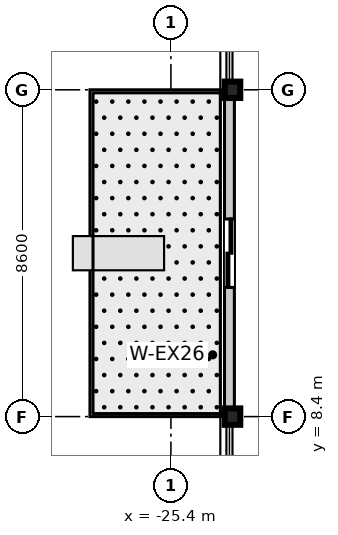
"""IFC4 building model, lengths in metres.
Left out: names, types, materials, properties, quantities, classifications, styles, units other than length and angle.
Written with IfcOpenShell. Run it as: python <this file> out.ifc"""

import sys

from ifc_helpers import new_model, si_unit, direction, frame, frame_2d, origin, origin_2d, place, context, subcontext, project, spatial, rectangle, i_section, extrude, source, transform, mapped, element, fill, save


model = new_model("IFC4")
c1 = context("Model", 3, precision=1e-05, world=origin(), true_north=direction((0.0, 1.0)))
c2 = subcontext(c1, "Body", "Model", "MODEL_VIEW")
j1 = project(units=[si_unit("LENGTHUNIT", "METRE"), si_unit("PLANEANGLEUNIT", "RADIAN")], contexts=[c1])
p1 = place(None, origin())
s1 = spatial("IfcSite", under=j1, at=p1, CompositionType="ELEMENT")
p2 = place(p1, origin())
s2 = spatial("IfcBuilding", under=s1, at=p2, CompositionType="ELEMENT")
p3 = place(p2, frame((0.0, 0.0, 91.95)))
s3 = spatial("IfcBuildingStorey", under=s2, at=p3, CompositionType="ELEMENT", Elevation=91.95)
m1 = source(origin(), c2, "Body", "SweptSolid", [
    extrude(i_section(OverallWidth=0.409, OverallDepth=0.43, WebThickness=0.021, FlangeThickness=0.034, at=origin_2d()), origin(), (0.0, 0.0, 1.0), 3.605),
])
for number, where, z_axis, x_axis in (
    (1, (-23.78, 8.4, 0.0), (0.0, 0.0, 1.0), (1.0, 0.0, 0.0)),
    (2, (-23.78, 17.0, 0.0), (0.0, 0.0, 1.0), (1.0, 0.0, 0.0)),
):
    element("IfcColumn", number, at=place(p3, frame(where, z_axis=z_axis, x_axis=x_axis)), inside=s3, PredefinedType="COLUMN", context=c2, shape_type="MappedRepresentation", body=[
        mapped(m1, transform((0.0, 0.0, 0.0), scale=1.0)),
    ])
m2 = source(origin(), c2, "Body", "SweptSolid", [
    extrude(rectangle(XDim=8.6, YDim=0.26, at=frame_2d((4.3, 0.0))), origin(), (0.0, 0.0, 1.0), 2.86),
])
p4 = place(p3, frame((-23.86, 8.4, 0.0), z_axis=(0.0, 0.0, 1.0), x_axis=(0.0, 1.0, 0.0)))
e3 = element("IfcWall", 3, at=p4, inside=s3, PredefinedType="STANDARD", context=c2, shape_type="MappedRepresentation", body=[
    mapped(m2, transform((0.0, 0.0, 0.0), scale=1.0)),
])
p5 = place(p4, frame((3.4, 0.0, 0.0)))
e4 = element("IfcOpeningElement", 4, at=p5, cuts=e3, PredefinedType="OPENING", context=c2, shape_type="SweptSolid", body=[
    extrude(rectangle(XDim=1.8, YDim=2.25, at=frame_2d((0.9, 1.125))), frame((0.0, 0.14, 0.0), z_axis=(0.0, -1.0, 0.0), x_axis=(1.0, 0.0, 0.0)), (0.0, 0.0, 1.0), 0.28),
])
m3 = source(origin(), c2, "Body", "SweptSolid", [
    extrude(rectangle(XDim=1.8, YDim=2.25, at=frame_2d((0.9, 1.125))), frame((0.0, 0.025, 0.0), z_axis=(0.0, -1.0, 0.0), x_axis=(1.0, 0.0, 0.0)), (0.0, 0.0, 1.0), 0.05),
])
p6 = place(p5, origin())
e5 = element("IfcDoor", 5, at=p6, inside=s3, OperationType="DOUBLE_DOOR_SLIDING", PredefinedType="DOOR", context=c2, shape_type="MappedRepresentation", body=[
    mapped(m3, transform((0.0, 0.0, 0.0), scale=1.0)),
])
fill(e4, e5)
save(model, sys.argv[1])
